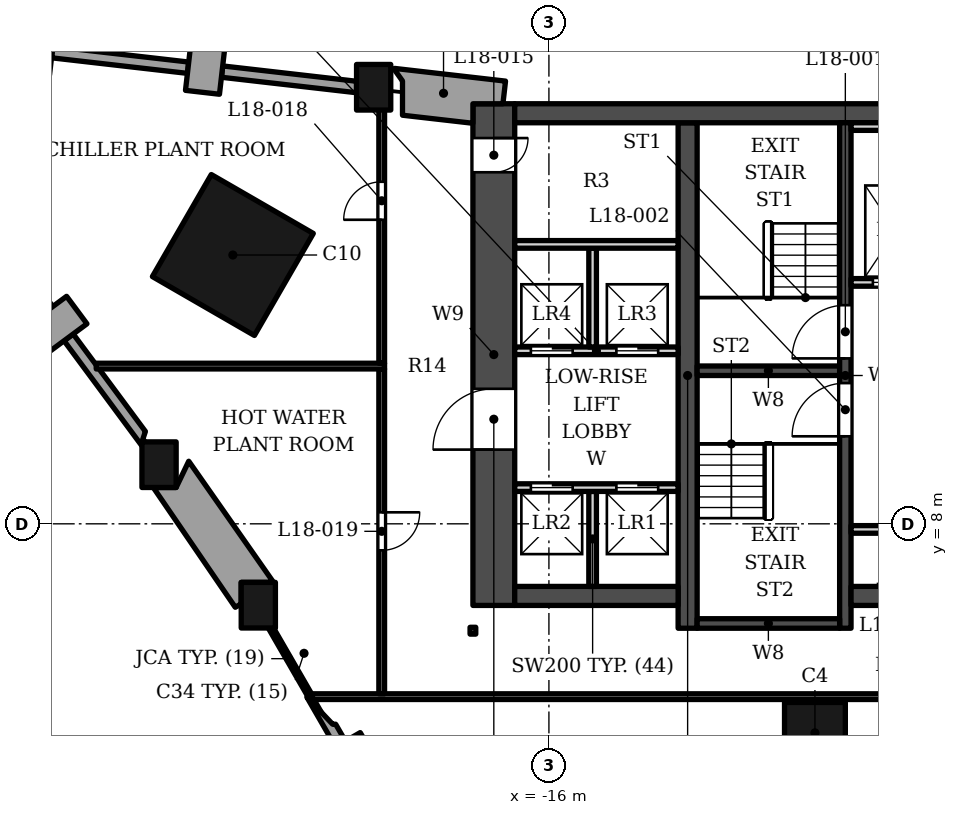
"""IFC4 building model, lengths in metres.
Left out: names, types, materials, properties, quantities, classifications, styles, units other than length and angle.
Written with IfcOpenShell. Run it as: python <this file> out.ifc"""

import sys

from ifc_helpers import new_model, si_unit, direction, frame, frame_2d, origin, origin_2d, place, context, subcontext, project, spatial, polyline, rectangle, outline, extrude, clip, halfspace, element, fill, save


model = new_model("IFC4")
c1 = context("Model", 3, precision=1e-05, world=origin(), true_north=direction((0.0, 1.0)))
c2 = subcontext(c1, "Body", "Model", "MODEL_VIEW")
j1 = project(units=[si_unit("LENGTHUNIT", "METRE"), si_unit("PLANEANGLEUNIT", "RADIAN")], contexts=[c1])
p1 = place(None, origin())
s1 = spatial("IfcSite", under=j1, at=p1, CompositionType="ELEMENT")
p2 = place(p1, origin())
s2 = spatial("IfcBuilding", under=s1, at=p2, CompositionType="ELEMENT")
p3 = place(p2, frame((0.0, 0.0, 86.8)))
s3 = spatial("IfcBuildingStorey", under=s2, at=p3, CompositionType="ELEMENT", Elevation=86.8)
p4 = place(p3, frame((-16.9, 18.802, 0.0), z_axis=(0.0, 0.0, 1.0), x_axis=(1.0, 0.0, 0.0)))
e1 = element("IfcWall", 1, at=p4, inside=s3, PredefinedType="SHEAR", context=c2, shape_type="SweptSolid", body=[
    extrude(rectangle(XDim=33.8, YDim=0.5, at=frame_2d((16.9, 0.0))), origin(), (0.0, 0.0, 1.0), 5.0),
])
p5 = place(p3, frame((-12.35, 5.253, 0.0), z_axis=(0.0, 0.0, 1.0), x_axis=(0.0, 1.0, 0.0)))
e2 = element("IfcWall", 2, at=p5, inside=s3, PredefinedType="SHEAR", context=c2, shape_type="SweptSolid", body=[
    extrude(rectangle(XDim=13.3, YDim=0.5, at=frame_2d((6.65, 0.0))), origin(), (0.0, 0.0, 1.0), 5.0),
])
p6 = place(p3, frame((-8.2, 5.253, 0.0), z_axis=(0.0, 0.0, 1.0), x_axis=(0.0, 1.0, 0.0)))
e3 = element("IfcWall", 3, at=p6, inside=s3, PredefinedType="SHEAR", context=c2, shape_type="SweptSolid", body=[
    extrude(rectangle(XDim=13.3, YDim=0.3, at=frame_2d((6.65, 0.0))), origin(), (0.0, 0.0, 1.0), 5.0),
])
p7 = place(p6, frame((7.1, 0.0, 0.0)))
e4 = element("IfcOpeningElement", 4, at=p7, cuts=e3, PredefinedType="OPENING", context=c2, shape_type="SweptSolid", body=[
    extrude(rectangle(XDim=1.4, YDim=2.1, at=frame_2d((0.7, 1.05))), frame((0.0, 0.16, 0.0), z_axis=(0.0, -1.0, 0.0), x_axis=(1.0, 0.0, 0.0)), (0.0, 0.0, 1.0), 0.32),
])
p8 = place(p6, frame((5.05, 0.0, 0.0)))
e5 = element("IfcOpeningElement", 5, at=p8, cuts=e3, PredefinedType="OPENING", context=c2, shape_type="SweptSolid", body=[
    extrude(rectangle(XDim=1.4, YDim=2.1, at=frame_2d((0.7, 1.05))), frame((0.0, 0.16, 0.0), z_axis=(0.0, -1.0, 0.0), x_axis=(1.0, 0.0, 0.0)), (0.0, 0.0, 1.0), 0.32),
])
for number, where, z_axis, x_axis in (
    (6, (-12.1, 12.028, 0.0), (0.0, 0.0, 1.0), (1.0, 0.0, 0.0)),
    (7, (-12.1, 5.378, 0.0), (0.0, 0.0, 1.0), (1.0, 0.0, 0.0)),
):
    element("IfcWall", number, at=place(p3, frame(where, z_axis=z_axis, x_axis=x_axis)), inside=s3, PredefinedType="SHEAR", context=c2, shape_type="SweptSolid", body=[
        extrude(rectangle(XDim=3.75, YDim=0.25, at=frame_2d((1.875, 0.0))), origin(), (0.0, 0.0, 1.0), 5.0),
    ])
p9 = place(p3, frame((-8.05, 6.103, 0.0), z_axis=(0.0, 0.0, 1.0), x_axis=(1.0, 0.0, 0.0)))
e8 = element("IfcWall", 8, at=p9, inside=s3, PredefinedType="SHEAR", context=c2, shape_type="SweptSolid", body=[
    extrude(rectangle(XDim=7.05, YDim=0.5, at=frame_2d((3.525, 0.0))), origin(), (0.0, 0.0, 1.0), 5.0),
])
p10 = place(p9, frame((0.825, 0.0, 0.0)))
e9 = element("IfcOpeningElement", 9, at=p10, cuts=e8, PredefinedType="OPENING", context=c2, shape_type="SweptSolid", body=[
    extrude(rectangle(XDim=0.9, YDim=2.1, at=frame_2d((0.45, 1.05))), frame((0.0, 0.26, 0.0), z_axis=(0.0, -1.0, 0.0), x_axis=(1.0, 0.0, 0.0)), (0.0, 0.0, 1.0), 0.52),
])
p11 = place(p3, frame((-12.6, 6.103, 0.0), z_axis=(0.0, 0.0, 1.0), x_axis=(-1.0, 0.0, 0.0)))
e10 = element("IfcWall", 10, at=p11, inside=s3, PredefinedType="SHEAR", context=c2, shape_type="SweptSolid", body=[
    extrude(rectangle(XDim=4.3, YDim=0.5, at=frame_2d((2.15, 0.0))), origin(), (0.0, 0.0, 1.0), 5.0),
])
p12 = place(p3, frame((-17.45, 5.853, 0.0), z_axis=(0.0, 0.0, 1.0), x_axis=(0.0, 1.0, 0.0)))
e11 = element("IfcWall", 11, at=p12, inside=s3, PredefinedType="SHEAR", context=c2, shape_type="SweptSolid", body=[
    extrude(rectangle(XDim=13.2, YDim=1.1, at=frame_2d((6.6, 0.0))), origin(), (0.0, 0.0, 1.0), 5.0),
])
p13 = place(p12, frame((4.1, 0.0, 0.0)))
e12 = element("IfcOpeningElement", 12, at=p13, cuts=e11, PredefinedType="OPENING", context=c2, shape_type="SweptSolid", body=[
    extrude(rectangle(XDim=1.6, YDim=2.1, at=frame_2d((0.8, 1.05))), frame((0.0, 0.56, 0.0), z_axis=(0.0, -1.0, 0.0), x_axis=(1.0, 0.0, 0.0)), (0.0, 0.0, 1.0), 1.12),
])
p14 = place(p12, frame((11.397, 0.0, 0.0)))
e13 = element("IfcOpeningElement", 13, at=p14, cuts=e11, PredefinedType="OPENING", context=c2, shape_type="SweptSolid", body=[
    extrude(rectangle(XDim=0.9, YDim=2.1, at=frame_2d((0.45, 1.05))), frame((0.0, 0.56, 0.0), z_axis=(0.0, -1.0, 0.0), x_axis=(1.0, 0.0, 0.0)), (0.0, 0.0, 1.0), 1.12),
])
p15 = place(p3, frame((-29.519, 20.462, 0.0), z_axis=(0.0, 0.0, 1.0), x_axis=(-0.993506319736, 0.113776942504, 0.0)))
e14 = element("IfcColumn", 14, at=p15, inside=s3, PredefinedType="COLUMN", context=c2, shape_type="SweptSolid", body=[
    extrude(rectangle(XDim=0.9, YDim=1.2, at=origin_2d()), origin(), (0.0, 0.0, 1.0), 5.0),
])
p16 = place(p3, frame((-24.317, 15.073, 0.0), z_axis=(0.0, 0.0, 1.0), x_axis=(0.866025412511, -0.499999984885, 0.0)))
e15 = element("IfcColumn", 15, at=p16, inside=s3, PredefinedType="COLUMN", context=c2, shape_type="SweptSolid", body=[
    extrude(rectangle(XDim=3.1, YDim=3.1, at=origin_2d()), origin(), (0.0, 0.0, 1.0), 5.0),
])
p17 = place(p3, frame((-9.0, 2.5, 0.0), z_axis=(0.0, 0.0, 1.0), x_axis=(1.0, 0.0, 0.0)))
e16 = element("IfcColumn", 16, at=p17, inside=s3, PredefinedType="COLUMN", context=c2, shape_type="SweptSolid", body=[
    extrude(rectangle(XDim=1.6, YDim=1.6, at=origin_2d()), origin(), (0.0, 0.0, 1.0), 5.0),
])
p18 = place(p3, frame((-23.647, 5.859, 0.0), z_axis=(0.394481265689, -0.415135992538, 0.81978450749), x_axis=(0.724910424913, 0.688843143141, 0.0)))
e17 = element("IfcColumn", 17, at=p18, inside=s3, PredefinedType="COLUMN", context=c2, shape_type="Clipping", body=[
    clip(clip(extrude(rectangle(XDim=0.9, YDim=1.2, at=origin_2d()), origin(), (0.0, 0.0, 1.0), 6.099), halfspace(frame((0.0, 0.0, 0.424), z_axis=(0.0, 0.0, 1.0), x_axis=(1.0, 0.0, 0.0)), True)), halfspace(frame((0.0, 0.0, 5.675), z_axis=(0.0, 0.0, 1.0), x_axis=(1.0, 0.0, 0.0)), False)),
])
p19 = place(p3, frame((-20.612, 19.487, 0.0), z_axis=(0.061468302485, -0.086327521183, 0.994368747938), x_axis=(0.814599345858, 0.580024056162, 0.0)))
e18 = element("IfcColumn", 18, at=p19, inside=s3, PredefinedType="COLUMN", context=c2, shape_type="Clipping", body=[
    clip(clip(extrude(rectangle(XDim=0.9, YDim=1.2, at=origin_2d()), origin(), (0.0, 0.0, 1.0), 5.028), halfspace(frame((0.0, 0.0, 0.068), z_axis=(0.0, 0.0, 1.0), x_axis=(1.0, 0.0, 0.0)), True)), halfspace(frame((0.0, 0.0, 4.96), z_axis=(0.0, 0.0, 1.0), x_axis=(1.0, 0.0, 0.0)), False)),
])
p20 = place(p3, frame((-26.259, 9.556, 0.0), z_axis=(0.098413977447, 0.296911537989, 0.949820102784), x_axis=(-0.949215713653, 0.314626014428, 0.0)))
e19 = element("IfcColumn", 19, at=p20, inside=s3, PredefinedType="COLUMN", context=c2, shape_type="Clipping", body=[
    clip(clip(extrude(rectangle(XDim=0.9, YDim=1.2, at=origin_2d()), origin(), (0.0, 0.0, 1.0), 5.264), halfspace(frame((0.0, 0.0, 0.202), z_axis=(0.0, 0.0, 1.0), x_axis=(1.0, 0.0, 0.0)), True)), halfspace(frame((0.0, 0.0, 5.062), z_axis=(0.0, 0.0, 1.0), x_axis=(1.0, 0.0, 0.0)), False)),
])
p21 = place(p3, frame((-21.779, 1.517, 0.0), z_axis=(0.0, 0.0, 1.0), x_axis=(0.866094119867, 0.499880961361, 0.0)))
e20 = element("IfcWall", 20, at=p21, inside=s3, PredefinedType="SOLIDWALL", context=c2, shape_type="SweptSolid", body=[
    extrude(rectangle(XDim=1.2, YDim=0.9, at=frame_2d((0.6, 0.0))), origin(), (0.0, 0.0, 1.0), 3.5),
])
p22 = place(p3, origin())
e21 = element("IfcWall", 21, at=p22, inside=s3, PredefinedType="ELEMENTEDWALL", context=c2, shape_type="SweptSolid", body=[
    extrude(outline(polyline([(-21.354, 2.282), (-21.611, 2.727), (-21.691, 2.727), (-22.371, 3.442), (-21.614, 2.132), (-21.354, 2.282)])), origin(), (0.0, 0.0, 1.0), 3.5),
])
p23 = place(p3, frame((-25.116, 19.354, 0.0), z_axis=(0.0, 0.0, 1.0), x_axis=(0.113735952551, 0.993511013073, 0.0)))
e22 = element("IfcWall", 22, at=p23, inside=s3, PredefinedType="SOLIDWALL", context=c2, shape_type="SweptSolid", body=[
    extrude(rectangle(XDim=1.2, YDim=0.9, at=frame_2d((0.6, 0.0))), origin(), (0.0, 0.0, 1.0), 3.5),
])
p24 = place(p3, origin())
e23 = element("IfcWall", 23, at=p24, inside=s3, PredefinedType="ELEMENTEDWALL", context=c2, shape_type="SweptSolid", body=[
    extrude(outline(polyline([(-24.618, 19.75), (-21.062, 19.343), (-21.062, 19.645), (-24.584, 20.048), (-24.618, 19.75)])), origin(), (0.0, 0.0, 1.0), 3.5),
])
p25 = place(p3, frame((-25.495, 20.001, 0.0), z_axis=(0.0, 0.0, 1.0), x_axis=(-0.993511890309, 0.113728289423, 0.0)))
e24 = element("IfcWall", 24, at=p25, inside=s3, PredefinedType="ELEMENTEDWALL", context=c2, shape_type="SweptSolid", body=[
    extrude(rectangle(XDim=3.6, YDim=0.3, at=frame_2d((1.8, 0.0))), origin(), (0.0, 0.0, 1.0), 3.5),
])
p26 = place(p3, frame((-29.388, 12.91, 0.0), z_axis=(0.0, 0.0, 1.0), x_axis=(0.803477891264, 0.595334593527, 0.0)))
e25 = element("IfcWall", 25, at=p26, inside=s3, PredefinedType="SOLIDWALL", context=c2, shape_type="SweptSolid", body=[
    extrude(rectangle(XDim=1.2, YDim=0.9, at=frame_2d((0.6, 0.0))), origin(), (0.0, 0.0, 1.0), 3.5),
])
p27 = place(p3, origin())
e26 = element("IfcWall", 26, at=p27, inside=s3, PredefinedType="ELEMENTEDWALL", context=c2, shape_type="SweptSolid", body=[
    extrude(outline(polyline([(-29.054, 13.718), (-31.196, 16.61), (-31.437, 16.431), (-29.295, 13.54), (-29.054, 13.718)])), origin(), (0.0, 0.0, 1.0), 3.5),
])
p28 = place(p3, origin())
e27 = element("IfcWall", 27, at=p28, inside=s3, PredefinedType="ELEMENTEDWALL", context=c2, shape_type="SweptSolid", body=[
    extrude(outline(polyline([(-28.759, 12.816), (-26.709, 10.049), (-26.709, 10.156), (-26.618, 10.43), (-28.518, 12.995), (-28.759, 12.816)])), origin(), (0.0, 0.0, 1.0), 3.5),
])
p29 = place(p3, origin())
e28 = element("IfcWall", 28, at=p29, inside=s3, PredefinedType="SOLIDWALL", context=c2, shape_type="SweptSolid", body=[
    extrude(outline(polyline([(-19.853, 18.751), (-18.0, 18.539), (-18.0, 19.052), (-17.21, 19.052), (-17.142, 19.649), (-20.062, 19.983), (-20.065, 19.951), (-19.853, 19.653), (-19.853, 18.751)])), origin(), (0.0, 0.0, 1.0), 3.5),
])
p30 = place(p3, origin())
e29 = element("IfcWall", 29, at=p30, inside=s3, PredefinedType="SOLIDWALL", context=c2, shape_type="SweptSolid", body=[
    extrude(outline(polyline([(-26.41, 8.956), (-24.254, 5.804), (-24.097, 5.894), (-24.097, 6.459), (-23.246, 6.459), (-25.478, 9.647), (-25.809, 8.956), (-26.41, 8.956)])), origin(), (0.0, 0.0, 1.0), 3.5),
])
p31 = place(p3, frame((-23.447, 5.487, 0.0), z_axis=(0.0, 0.0, 1.0), x_axis=(0.500017192868, -0.86601547725, 0.0)))
e30 = element("IfcWall", 30, at=p31, inside=s3, PredefinedType="SOLIDWALL", context=c2, shape_type="SweptSolid", body=[
    extrude(rectangle(XDim=2.39, YDim=0.12, at=frame_2d((1.195, 0.0))), origin(), (0.0, 0.0, 1.0), 3.5),
])
for number, where, z_axis, x_axis in (
    (31, (-14.85, 6.353, 0.0), (0.0, 0.0, 1.0), (0.0, 1.0, 0.0)),
    (32, (-8.05, 7.853, 0.0), (0.0, 0.0, 1.0), (1.0, 0.0, 0.0)),
):
    element("IfcWall", number, at=place(p3, frame(where, z_axis=z_axis, x_axis=x_axis)), inside=s3, PredefinedType="SOLIDWALL", context=c2, shape_type="SweptSolid", body=[
        extrude(rectangle(XDim=2.5, YDim=0.2, at=frame_2d((1.25, 0.0))), origin(), (0.0, 0.0, 1.0), 4.83),
    ])
p32 = place(p3, frame((-16.9, 8.953, 0.0), z_axis=(0.0, 0.0, 1.0), x_axis=(1.0, 0.0, 0.0)))
e33 = element("IfcWall", 33, at=p32, inside=s3, PredefinedType="SOLIDWALL", context=c2, shape_type="SweptSolid", body=[
    extrude(rectangle(XDim=4.3, YDim=0.2, at=frame_2d((2.15, 0.0))), origin(), (0.0, 0.0, 1.0), 4.83),
])
p33 = place(p32, frame((2.675, 0.0, 0.0)))
e34 = element("IfcOpeningElement", 34, at=p33, cuts=e33, PredefinedType="OPENING", context=c2, shape_type="SweptSolid", body=[
    extrude(rectangle(XDim=1.1, YDim=2.1, at=frame_2d((0.55, 1.05))), frame((0.0, 0.11, 0.0), z_axis=(0.0, -1.0, 0.0), x_axis=(1.0, 0.0, 0.0)), (0.0, 0.0, 1.0), 0.22),
])
p34 = place(p32, frame((0.425, 0.0, 0.0)))
e35 = element("IfcOpeningElement", 35, at=p34, cuts=e33, PredefinedType="OPENING", context=c2, shape_type="SweptSolid", body=[
    extrude(rectangle(XDim=1.1, YDim=2.1, at=frame_2d((0.55, 1.05))), frame((0.0, 0.11, 0.0), z_axis=(0.0, -1.0, 0.0), x_axis=(1.0, 0.0, 0.0)), (0.0, 0.0, 1.0), 0.22),
])
p35 = place(p3, frame((-16.9, 12.552, 0.0), z_axis=(0.0, 0.0, 1.0), x_axis=(1.0, 0.0, 0.0)))
e36 = element("IfcWall", 36, at=p35, inside=s3, PredefinedType="SOLIDWALL", context=c2, shape_type="SweptSolid", body=[
    extrude(rectangle(XDim=4.3, YDim=0.2, at=frame_2d((2.15, 0.0))), origin(), (0.0, 0.0, 1.0), 4.83),
])
p36 = place(p35, frame((2.675, 0.0, 0.0)))
e37 = element("IfcOpeningElement", 37, at=p36, cuts=e36, PredefinedType="OPENING", context=c2, shape_type="SweptSolid", body=[
    extrude(rectangle(XDim=1.1, YDim=2.1, at=frame_2d((0.55, 1.05))), frame((0.0, 0.11, 0.0), z_axis=(0.0, -1.0, 0.0), x_axis=(1.0, 0.0, 0.0)), (0.0, 0.0, 1.0), 0.22),
])
p37 = place(p35, frame((0.425, 0.0, 0.0)))
e38 = element("IfcOpeningElement", 38, at=p37, cuts=e36, PredefinedType="OPENING", context=c2, shape_type="SweptSolid", body=[
    extrude(rectangle(XDim=1.1, YDim=2.1, at=frame_2d((0.55, 1.05))), frame((0.0, 0.11, 0.0), z_axis=(0.0, -1.0, 0.0), x_axis=(1.0, 0.0, 0.0)), (0.0, 0.0, 1.0), 0.22),
])
p38 = place(p3, frame((-14.85, 12.653, 0.0), z_axis=(0.0, 0.0, 1.0), x_axis=(0.0, 1.0, 0.0)))
e39 = element("IfcWall", 39, at=p38, inside=s3, PredefinedType="SOLIDWALL", context=c2, shape_type="SweptSolid", body=[
    extrude(rectangle(XDim=2.6, YDim=0.2, at=frame_2d((1.3, 0.0))), origin(), (0.0, 0.0, 1.0), 4.83),
])
p39 = place(p3, frame((-8.05, 14.353, 0.0), z_axis=(0.0, 0.0, 1.0), x_axis=(1.0, 0.0, 0.0)))
e40 = element("IfcWall", 40, at=p39, inside=s3, PredefinedType="SOLIDWALL", context=c2, shape_type="SweptSolid", body=[
    extrude(rectangle(XDim=2.35, YDim=0.2, at=frame_2d((1.175, 0.0))), origin(), (0.0, 0.0, 1.0), 4.83),
])
p40 = place(p39, frame((0.575, 0.0, 0.0)))
e41 = element("IfcOpeningElement", 41, at=p40, cuts=e40, PredefinedType="OPENING", context=c2, shape_type="SweptSolid", body=[
    extrude(rectangle(XDim=1.2, YDim=2.1, at=frame_2d((0.6, 1.05))), frame((0.0, 0.11, 0.0), z_axis=(0.0, -1.0, 0.0), x_axis=(1.0, 0.0, 0.0)), (0.0, 0.0, 1.0), 0.22),
])
p41 = place(p3, frame((-16.9, 15.353, 0.0), z_axis=(0.0, 0.0, 1.0), x_axis=(1.0, 0.0, 0.0)))
e42 = element("IfcWall", 42, at=p41, inside=s3, PredefinedType="SOLIDWALL", context=c2, shape_type="SweptSolid", body=[
    extrude(rectangle(XDim=4.3, YDim=0.2, at=frame_2d((2.15, 0.0))), origin(), (0.0, 0.0, 1.0), 4.83),
])
p42 = place(p3, frame((-8.05, 18.453, 0.0), z_axis=(0.0, 0.0, 1.0), x_axis=(1.0, 0.0, 0.0)))
e43 = element("IfcWall", 43, at=p42, inside=s3, PredefinedType="SOLIDWALL", context=c2, shape_type="SweptSolid", body=[
    extrude(rectangle(XDim=2.35, YDim=0.2, at=frame_2d((1.175, 0.0))), origin(), (0.0, 0.0, 1.0), 4.83),
])
p43 = place(p3, frame((-22.223, 3.453, 0.0), z_axis=(0.0, 0.0, 1.0), x_axis=(1.0, 0.0, 0.0)))
e44 = element("IfcWall", 44, at=p43, inside=s3, PredefinedType="PARTITIONING", context=c2, shape_type="SweptSolid", body=[
    extrude(rectangle(XDim=24.828, YDim=0.15, at=frame_2d((12.414, 0.0))), origin(), (0.0, 0.0, 1.0), 3.752),
])
p44 = place(p43, frame((15.374, 0.0, 0.0)))
e45 = element("IfcOpeningElement", 45, at=p44, cuts=e44, PredefinedType="OPENING", context=c2, shape_type="SweptSolid", body=[
    extrude(rectangle(XDim=1.0, YDim=2.1, at=frame_2d((0.5, 1.05))), frame((0.0, 0.085, 0.0), z_axis=(0.0, -1.0, 0.0), x_axis=(1.0, 0.0, 0.0)), (0.0, 0.0, 1.0), 0.17),
])
p45 = place(p3, frame((-20.4, 3.528, 0.0), z_axis=(0.0, 0.0, 1.0), x_axis=(0.0, 1.0, 0.0)))
e46 = element("IfcWall", 46, at=p45, inside=s3, PredefinedType="PARTITIONING", context=c2, shape_type="SweptSolid", body=[
    extrude(rectangle(XDim=8.548, YDim=0.15, at=frame_2d((4.274, 0.0))), origin(), (0.0, 0.0, 1.0), 4.05),
])
p46 = place(p45, frame((3.775, 0.0, 0.0)))
e47 = element("IfcOpeningElement", 47, at=p46, cuts=e46, PredefinedType="OPENING", context=c2, shape_type="SweptSolid", body=[
    extrude(rectangle(XDim=1.0, YDim=2.1, at=frame_2d((0.5, 1.05))), frame((0.0, 0.085, 0.0), z_axis=(0.0, -1.0, 0.0), x_axis=(1.0, 0.0, 0.0)), (0.0, 0.0, 1.0), 0.17),
])
p47 = place(p3, frame((-18.0, 5.098, 0.0), z_axis=(0.0, 0.0, 1.0), x_axis=(0.0, 1.0, 0.0)))
e48 = element("IfcWall", 48, at=p47, inside=s3, PredefinedType="PARTITIONING", context=c2, shape_type="SweptSolid", body=[
    extrude(rectangle(XDim=0.18, YDim=0.15, at=frame_2d((0.09, 0.0))), origin(), (0.0, 0.0, 1.0), 4.83),
])
p48 = place(p3, frame((-27.912, 12.15, 0.0), z_axis=(0.0, 0.0, 1.0), x_axis=(1.0, 0.0, 0.0)))
e49 = element("IfcWall", 49, at=p48, inside=s3, PredefinedType="PARTITIONING", context=c2, shape_type="SweptSolid", body=[
    extrude(rectangle(XDim=7.587, YDim=0.15, at=frame_2d((3.793, 0.0))), origin(), (0.0, 0.0, 1.0), 3.752),
])
p49 = place(p3, frame((-20.4, 12.225, 0.0), z_axis=(0.0, 0.0, 1.0), x_axis=(0.0, 1.0, 0.0)))
e50 = element("IfcWall", 50, at=p49, inside=s3, PredefinedType="PARTITIONING", context=c2, shape_type="SweptSolid", body=[
    extrude(rectangle(XDim=6.966, YDim=0.15, at=frame_2d((3.483, 0.0))), origin(), (0.0, 0.0, 1.0), 3.752),
])
p50 = place(p49, frame((3.775, 0.0, 0.0)))
e51 = element("IfcOpeningElement", 51, at=p50, cuts=e50, PredefinedType="OPENING", context=c2, shape_type="SweptSolid", body=[
    extrude(rectangle(XDim=1.0, YDim=2.1, at=frame_2d((0.5, 1.05))), frame((0.0, 0.085, 0.0), z_axis=(0.0, -1.0, 0.0), x_axis=(1.0, 0.0, 0.0)), (0.0, 0.0, 1.0), 0.17),
])
p51 = place(p40, origin())
e52 = element("IfcDoor", 52, at=p51, inside=s3, OperationType="DOUBLE_DOOR_SLIDING", PredefinedType="DOOR", context=c2, shape_type="SweptSolid", body=[
    extrude(rectangle(XDim=1.2, YDim=2.1, at=frame_2d((0.6, 1.05))), frame((0.0, 0.025, 0.0), z_axis=(0.0, -1.0, 0.0), x_axis=(1.0, 0.0, 0.0)), (0.0, 0.0, 1.0), 0.05),
])
fill(e41, e52)
p52 = place(p33, origin())
e53 = element("IfcDoor", 53, at=p52, inside=s3, OperationType="DOUBLE_DOOR_SLIDING", PredefinedType="DOOR", context=c2, shape_type="SweptSolid", body=[
    extrude(rectangle(XDim=1.1, YDim=2.1, at=frame_2d((0.55, 1.05))), frame((0.0, 0.025, 0.0), z_axis=(0.0, -1.0, 0.0), x_axis=(1.0, 0.0, 0.0)), (0.0, 0.0, 1.0), 0.05),
])
fill(e34, e53)
p53 = place(p36, origin())
e54 = element("IfcDoor", 54, at=p53, inside=s3, OperationType="DOUBLE_DOOR_SLIDING", PredefinedType="DOOR", context=c2, shape_type="SweptSolid", body=[
    extrude(rectangle(XDim=1.1, YDim=2.1, at=frame_2d((0.55, 1.05))), frame((0.0, 0.025, 0.0), z_axis=(0.0, -1.0, 0.0), x_axis=(1.0, 0.0, 0.0)), (0.0, 0.0, 1.0), 0.05),
])
fill(e37, e54)
p54 = place(p34, origin())
e55 = element("IfcDoor", 55, at=p54, inside=s3, OperationType="DOUBLE_DOOR_SLIDING", PredefinedType="DOOR", context=c2, shape_type="SweptSolid", body=[
    extrude(rectangle(XDim=1.1, YDim=2.1, at=frame_2d((0.55, 1.05))), frame((0.0, 0.025, 0.0), z_axis=(0.0, -1.0, 0.0), x_axis=(1.0, 0.0, 0.0)), (0.0, 0.0, 1.0), 0.05),
])
fill(e35, e55)
p55 = place(p37, origin())
e56 = element("IfcDoor", 56, at=p55, inside=s3, OperationType="DOUBLE_DOOR_SLIDING", PredefinedType="DOOR", context=c2, shape_type="SweptSolid", body=[
    extrude(rectangle(XDim=1.1, YDim=2.1, at=frame_2d((0.55, 1.05))), frame((0.0, 0.025, 0.0), z_axis=(0.0, -1.0, 0.0), x_axis=(1.0, 0.0, 0.0)), (0.0, 0.0, 1.0), 0.05),
])
fill(e38, e56)
p56 = place(p7, origin())
e57 = element("IfcDoor", 57, at=p56, inside=s3, OperationType="SINGLE_SWING_LEFT", PredefinedType="DOOR", context=c2, shape_type="SweptSolid", body=[
    extrude(rectangle(XDim=1.4, YDim=2.1, at=frame_2d((0.7, 1.05))), frame((0.0, 0.025, 0.0), z_axis=(0.0, -1.0, 0.0), x_axis=(1.0, 0.0, 0.0)), (0.0, 0.0, 1.0), 0.05),
])
fill(e4, e57)
p57 = place(p8, origin())
e58 = element("IfcDoor", 58, at=p57, inside=s3, OperationType="SINGLE_SWING_LEFT", PredefinedType="DOOR", context=c2, shape_type="SweptSolid", body=[
    extrude(rectangle(XDim=1.4, YDim=2.1, at=frame_2d((0.7, 1.05))), frame((0.0, 0.025, 0.0), z_axis=(0.0, -1.0, 0.0), x_axis=(1.0, 0.0, 0.0)), (0.0, 0.0, 1.0), 0.05),
])
fill(e5, e58)
p58 = place(p13, origin())
e59 = element("IfcDoor", 59, at=p58, inside=s3, OperationType="DOUBLE_DOOR_SINGLE_SWING", PredefinedType="DOOR", context=c2, shape_type="SweptSolid", body=[
    extrude(rectangle(XDim=1.6, YDim=2.1, at=frame_2d((0.8, 1.05))), frame((0.0, -0.225, 0.0), z_axis=(0.0, -1.0, 0.0), x_axis=(1.0, 0.0, 0.0)), (0.0, 0.0, 1.0), 0.05),
])
fill(e12, e59)
p59 = place(p14, origin())
e60 = element("IfcDoor", 60, at=p59, inside=s3, OperationType="SINGLE_SWING_RIGHT", PredefinedType="DOOR", context=c2, shape_type="SweptSolid", body=[
    extrude(rectangle(XDim=0.9, YDim=2.1, at=frame_2d((0.45, 1.05))), frame((0.0, -0.225, 0.0), z_axis=(0.0, -1.0, 0.0), x_axis=(1.0, 0.0, 0.0)), (0.0, 0.0, 1.0), 0.05),
])
fill(e13, e60)
p60 = place(p50, origin())
e61 = element("IfcDoor", 61, at=p60, inside=s3, OperationType="SINGLE_SWING_LEFT", PredefinedType="DOOR", context=c2, shape_type="SweptSolid", body=[
    extrude(rectangle(XDim=1.0, YDim=2.1, at=frame_2d((0.5, 1.05))), frame((0.0, 0.025, 0.0), z_axis=(0.0, -1.0, 0.0), x_axis=(1.0, 0.0, 0.0)), (0.0, 0.0, 1.0), 0.05),
])
fill(e51, e61)
p61 = place(p46, origin())
e62 = element("IfcDoor", 62, at=p61, inside=s3, OperationType="SINGLE_SWING_RIGHT", PredefinedType="DOOR", context=c2, shape_type="SweptSolid", body=[
    extrude(rectangle(XDim=1.0, YDim=2.1, at=frame_2d((0.5, 1.05))), frame((0.0, 0.025, 0.0), z_axis=(0.0, -1.0, 0.0), x_axis=(1.0, 0.0, 0.0)), (0.0, 0.0, 1.0), 0.05),
])
fill(e47, e62)
save(model, sys.argv[1])
